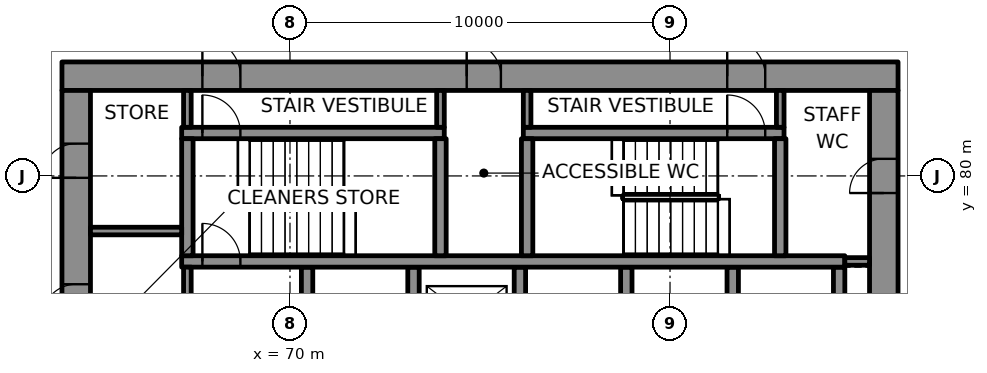
"""IFC4 building model, lengths in metres.
Left out: names, types, materials, properties, quantities, classifications, styles, units other than length and angle.
Written with IfcOpenShell. Run it as: python <this file> out.ifc"""

import sys

from ifc_helpers import new_model, si_unit, direction, frame, frame_2d, origin, place, context, subcontext, project, spatial, rectangle, extrude, element, fill, save


model = new_model("IFC4")
c1 = context("Model", 3, precision=1e-05, world=origin(), true_north=direction((0.0, 1.0)))
c2 = subcontext(c1, "Body", "Model", "MODEL_VIEW")
j1 = project(units=[si_unit("LENGTHUNIT", "METRE"), si_unit("PLANEANGLEUNIT", "RADIAN")], contexts=[c1])
p1 = place(None, origin())
s1 = spatial("IfcSite", under=j1, at=p1, CompositionType="ELEMENT")
p2 = place(p1, origin())
s2 = spatial("IfcBuilding", under=s1, at=p2, CompositionType="ELEMENT")
p3 = place(p2, frame((0.0, 0.0, 241.6)))
s3 = spatial("IfcBuildingStorey", under=s2, at=p3, CompositionType="ELEMENT", Elevation=241.6)
p4 = place(p3, frame((64.0, 82.625, 0.0), z_axis=(0.0, 0.0, 1.0), x_axis=(1.0, 0.0, 0.0)))
e1 = element("IfcWall", 1, at=p4, inside=s3, PredefinedType="SHEAR", context=c2, shape_type="SweptSolid", body=[
    extrude(rectangle(XDim=22.0, YDim=0.75, at=frame_2d((11.0, 0.0))), origin(), (0.0, 0.0, 1.0), 5.55),
])
p5 = place(p4, frame((3.695, 0.0, 0.0)))
e2 = element("IfcOpeningElement", 2, at=p5, cuts=e1, PredefinedType="OPENING", context=c2, shape_type="SweptSolid", body=[
    extrude(rectangle(XDim=1.0, YDim=2.1, at=frame_2d((0.5, 1.05))), frame((0.0, 0.385, 0.0), z_axis=(0.0, -1.0, 0.0), x_axis=(1.0, 0.0, 0.0)), (0.0, 0.0, 1.0), 0.77),
])
p6 = place(p4, frame((17.505, 0.0, 0.0)))
e3 = element("IfcOpeningElement", 3, at=p6, cuts=e1, PredefinedType="OPENING", context=c2, shape_type="SweptSolid", body=[
    extrude(rectangle(XDim=1.0, YDim=2.1, at=frame_2d((0.5, 1.05))), frame((0.0, 0.385, 0.0), z_axis=(0.0, -1.0, 0.0), x_axis=(1.0, 0.0, 0.0)), (0.0, 0.0, 1.0), 0.77),
])
p7 = place(p4, frame((10.65, 0.0, 0.0)))
e4 = element("IfcOpeningElement", 4, at=p7, cuts=e1, PredefinedType="OPENING", context=c2, shape_type="SweptSolid", body=[
    extrude(rectangle(XDim=0.9, YDim=2.1, at=frame_2d((0.45, 1.05))), frame((0.0, 0.385, 0.0), z_axis=(0.0, -1.0, 0.0), x_axis=(1.0, 0.0, 0.0)), (0.0, 0.0, 1.0), 0.77),
])
p8 = place(p3, frame((64.375, 67.75, 0.0), z_axis=(0.0, 0.0, 1.0), x_axis=(0.0, 1.0, 0.0)))
e5 = element("IfcWall", 5, at=p8, inside=s3, PredefinedType="SHEAR", context=c2, shape_type="SweptSolid", body=[
    extrude(rectangle(XDim=14.5, YDim=0.75, at=frame_2d((7.25, 0.0))), origin(), (0.0, 0.0, 1.0), 5.55),
])
p9 = place(p8, frame((4.65, 0.0, 0.0)))
e6 = element("IfcOpeningElement", 6, at=p9, cuts=e5, PredefinedType="OPENING", context=c2, shape_type="SweptSolid", body=[
    extrude(rectangle(XDim=1.8, YDim=2.1, at=frame_2d((0.9, 1.05))), frame((0.0, 0.385, 0.0), z_axis=(0.0, -1.0, 0.0), x_axis=(1.0, 0.0, 0.0)), (0.0, 0.0, 1.0), 0.77),
])
p10 = place(p8, frame((8.5, 0.0, 0.0)))
e7 = element("IfcOpeningElement", 7, at=p10, cuts=e5, PredefinedType="OPENING", context=c2, shape_type="SweptSolid", body=[
    extrude(rectangle(XDim=0.9, YDim=2.1, at=frame_2d((0.45, 1.05))), frame((0.0, 0.385, 0.0), z_axis=(0.0, -1.0, 0.0), x_axis=(1.0, 0.0, 0.0)), (0.0, 0.0, 1.0), 0.77),
])
p11 = place(p8, frame((12.2, 0.0, 0.0)))
e8 = element("IfcOpeningElement", 8, at=p11, cuts=e5, PredefinedType="OPENING", context=c2, shape_type="SweptSolid", body=[
    extrude(rectangle(XDim=0.9, YDim=2.1, at=frame_2d((0.45, 1.05))), frame((0.0, 0.385, 0.0), z_axis=(0.0, -1.0, 0.0), x_axis=(1.0, 0.0, 0.0)), (0.0, 0.0, 1.0), 0.77),
])
p12 = place(p3, frame((85.625, 67.75, 0.0), z_axis=(0.0, 0.0, 1.0), x_axis=(0.0, 1.0, 0.0)))
e9 = element("IfcWall", 9, at=p12, inside=s3, PredefinedType="SHEAR", context=c2, shape_type="SweptSolid", body=[
    extrude(rectangle(XDim=14.5, YDim=0.75, at=frame_2d((7.25, 0.0))), origin(), (0.0, 0.0, 1.0), 5.55),
])
p13 = place(p12, frame((4.65, 0.0, 0.0)))
e10 = element("IfcOpeningElement", 10, at=p13, cuts=e9, PredefinedType="OPENING", context=c2, shape_type="SweptSolid", body=[
    extrude(rectangle(XDim=1.8, YDim=2.1, at=frame_2d((0.9, 1.05))), frame((0.0, 0.385, 0.0), z_axis=(0.0, -1.0, 0.0), x_axis=(1.0, 0.0, 0.0)), (0.0, 0.0, 1.0), 0.77),
])
p14 = place(p12, frame((11.8, 0.0, 0.0)))
e11 = element("IfcOpeningElement", 11, at=p14, cuts=e9, PredefinedType="OPENING", context=c2, shape_type="SweptSolid", body=[
    extrude(rectangle(XDim=0.9, YDim=2.1, at=frame_2d((0.45, 1.05))), frame((0.0, 0.385, 0.0), z_axis=(0.0, -1.0, 0.0), x_axis=(1.0, 0.0, 0.0)), (0.0, 0.0, 1.0), 0.77),
])
p15 = place(p3, frame((70.45, 75.0, 0.0), z_axis=(0.0, 0.0, 1.0), x_axis=(0.0, 1.0, 0.0)))
e12 = element("IfcWall", 12, at=p15, inside=s3, PredefinedType="SHEAR", context=c2, shape_type="SweptSolid", body=[
    extrude(rectangle(XDim=2.6, YDim=0.3, at=frame_2d((1.3, 0.0))), origin(), (0.0, 0.0, 1.0), 5.55),
])
p16 = place(p15, frame((0.15, 0.0, 0.0)))
e13 = element("IfcOpeningElement", 13, at=p16, cuts=e12, PredefinedType="OPENING", context=c2, shape_type="SweptSolid", body=[
    extrude(rectangle(XDim=1.1, YDim=2.1, at=frame_2d((0.55, 1.05))), frame((0.0, 0.16, 0.0), z_axis=(0.0, -1.0, 0.0), x_axis=(1.0, 0.0, 0.0)), (0.0, 0.0, 1.0), 0.32),
])
for number, where, z_axis, x_axis in (
    (14, (73.25, 75.0, 0.0), (0.0, 0.0, 1.0), (0.0, 1.0, 0.0)),
    (15, (76.05, 75.0, 0.0), (0.0, 0.0, 1.0), (0.0, 1.0, 0.0)),
    (16, (78.85, 75.0, 0.0), (0.0, 0.0, 1.0), (0.0, 1.0, 0.0)),
    (17, (81.65, 75.0, 0.0), (0.0, 0.0, 1.0), (0.0, 1.0, 0.0)),
    (18, (84.45, 75.0, 0.0), (0.0, 0.0, 1.0), (0.0, 1.0, 0.0)),
):
    element("IfcWall", number, at=place(p3, frame(where, z_axis=z_axis, x_axis=x_axis)), inside=s3, PredefinedType="SHEAR", context=c2, shape_type="SweptSolid", body=[
        extrude(rectangle(XDim=2.6, YDim=0.3, at=frame_2d((1.3, 0.0))), origin(), (0.0, 0.0, 1.0), 5.55),
    ])
p17 = place(p3, frame((67.15, 77.75, 0.0), z_axis=(0.0, 0.0, 1.0), x_axis=(1.0, 0.0, 0.0)))
e19 = element("IfcWall", 19, at=p17, inside=s3, PredefinedType="SHEAR", context=c2, shape_type="SweptSolid", body=[
    extrude(rectangle(XDim=17.45, YDim=0.3, at=frame_2d((8.725, 0.0))), origin(), (0.0, 0.0, 1.0), 5.55),
])
p18 = place(p17, frame((0.545, 0.0, 0.0)))
e20 = element("IfcOpeningElement", 20, at=p18, cuts=e19, PredefinedType="OPENING", context=c2, shape_type="SweptSolid", body=[
    extrude(rectangle(XDim=1.0, YDim=2.1, at=frame_2d((0.5, 1.05))), frame((0.0, 0.16, 0.0), z_axis=(0.0, -1.0, 0.0), x_axis=(1.0, 0.0, 0.0)), (0.0, 0.0, 1.0), 0.32),
])
p19 = place(p3, frame((67.15, 81.13, 0.0), z_axis=(0.0, 0.0, 1.0), x_axis=(1.0, 0.0, 0.0)))
e21 = element("IfcWall", 21, at=p19, inside=s3, PredefinedType="SHEAR", context=c2, shape_type="SweptSolid", body=[
    extrude(rectangle(XDim=6.91, YDim=0.3, at=frame_2d((3.455, 0.0))), origin(), (0.0, 0.0, 1.0), 5.55),
])
p20 = place(p19, frame((0.545, 0.0, 0.0)))
e22 = element("IfcOpeningElement", 22, at=p20, cuts=e21, PredefinedType="OPENING", context=c2, shape_type="SweptSolid", body=[
    extrude(rectangle(XDim=1.0, YDim=2.1, at=frame_2d((0.5, 1.05))), frame((0.0, 0.16, 0.0), z_axis=(0.0, -1.0, 0.0), x_axis=(1.0, 0.0, 0.0)), (0.0, 0.0, 1.0), 0.32),
])
p21 = place(p3, frame((76.14, 81.13, 0.0), z_axis=(0.0, 0.0, 1.0), x_axis=(1.0, 0.0, 0.0)))
e23 = element("IfcWall", 23, at=p21, inside=s3, PredefinedType="SHEAR", context=c2, shape_type="SweptSolid", body=[
    extrude(rectangle(XDim=6.86, YDim=0.3, at=frame_2d((3.43, 0.0))), origin(), (0.0, 0.0, 1.0), 5.55),
])
p22 = place(p21, frame((5.365, 0.0, 0.0)))
e24 = element("IfcOpeningElement", 24, at=p22, cuts=e23, PredefinedType="OPENING", context=c2, shape_type="SweptSolid", body=[
    extrude(rectangle(XDim=1.0, YDim=2.1, at=frame_2d((0.5, 1.05))), frame((0.0, 0.16, 0.0), z_axis=(0.0, -1.0, 0.0), x_axis=(1.0, 0.0, 0.0)), (0.0, 0.0, 1.0), 0.32),
])
for number, where, z_axis, x_axis in (
    (25, (67.3, 77.9, 0.0), (0.0, 0.0, 1.0), (0.0, 1.0, 0.0)),
    (26, (73.96, 77.9, 0.0), (0.0, 0.0, 1.0), (0.0, 1.0, 0.0)),
    (27, (76.24, 77.9, 0.0), (0.0, 0.0, 1.0), (0.0, 1.0, 0.0)),
    (28, (82.9, 77.9, 0.0), (0.0, 0.0, 1.0), (0.0, 1.0, 0.0)),
):
    element("IfcWall", number, at=place(p3, frame(where, z_axis=z_axis, x_axis=x_axis)), inside=s3, PredefinedType="SHEAR", context=c2, shape_type="SweptSolid", body=[
        extrude(rectangle(XDim=3.08, YDim=0.3, at=frame_2d((1.54, 0.0))), origin(), (0.0, 0.0, 1.0), 5.55),
    ])
p23 = place(p3, frame((84.6, 77.75, 0.0), z_axis=(0.0, 0.0, 1.0), x_axis=(1.0, 0.0, 0.0)))
e29 = element("IfcWall", 29, at=p23, inside=s3, PredefinedType="PARTITIONING", context=c2, shape_type="SweptSolid", body=[
    extrude(rectangle(XDim=0.65, YDim=0.2, at=frame_2d((0.325, 0.0))), origin(), (0.0, 0.0, 1.0), 5.55),
])
p24 = place(p3, frame((64.75, 78.55, 0.0), z_axis=(0.0, 0.0, 1.0), x_axis=(1.0, 0.0, 0.0)))
e30 = element("IfcWall", 30, at=p24, inside=s3, PredefinedType="PARTITIONING", context=c2, shape_type="SweptSolid", body=[
    extrude(rectangle(XDim=2.4, YDim=0.2, at=frame_2d((1.2, 0.0))), origin(), (0.0, 0.0, 1.0), 5.55),
])
p25 = place(p3, frame((67.3, 71.85, 0.0), z_axis=(0.0, 0.0, 1.0), x_axis=(0.0, 1.0, 0.0)))
e31 = element("IfcWall", 31, at=p25, inside=s3, PredefinedType="PARTITIONING", context=c2, shape_type="SweptSolid", body=[
    extrude(rectangle(XDim=5.75, YDim=0.2, at=frame_2d((2.875, 0.0))), origin(), (0.0, 0.0, 1.0), 5.55),
])
p26 = place(p25, frame((0.85, 0.0, 0.0)))
e32 = element("IfcOpeningElement", 32, at=p26, cuts=e31, PredefinedType="OPENING", context=c2, shape_type="SweptSolid", body=[
    extrude(rectangle(XDim=1.2, YDim=2.1, at=frame_2d((0.6, 1.05))), frame((0.0, 0.11, 0.0), z_axis=(0.0, -1.0, 0.0), x_axis=(1.0, 0.0, 0.0)), (0.0, 0.0, 1.0), 0.22),
])
for number, where, z_axis, x_axis in (
    (33, (67.3, 81.28, 0.0), (0.0, 0.0, 1.0), (0.0, 1.0, 0.0)),
    (34, (73.96, 81.28, 0.0), (0.0, 0.0, 1.0), (0.0, 1.0, 0.0)),
    (35, (76.24, 81.28, 0.0), (0.0, 0.0, 1.0), (0.0, 1.0, 0.0)),
    (36, (82.9, 81.28, 0.0), (0.0, 0.0, 1.0), (0.0, 1.0, 0.0)),
):
    element("IfcWall", number, at=place(p3, frame(where, z_axis=z_axis, x_axis=x_axis)), inside=s3, PredefinedType="PARTITIONING", context=c2, shape_type="SweptSolid", body=[
        extrude(rectangle(XDim=0.97, YDim=0.2, at=frame_2d((0.485, 0.0))), origin(), (0.0, 0.0, 1.0), 5.55),
    ])
p27 = place(p18, origin())
e37 = element("IfcDoor", 37, at=p27, inside=s3, OperationType="SINGLE_SWING_LEFT", PredefinedType="DOOR", context=c2, shape_type="SweptSolid", body=[
    extrude(rectangle(XDim=1.0, YDim=2.1, at=frame_2d((0.5, 1.05))), frame((0.0, 0.025, 0.0), z_axis=(0.0, -1.0, 0.0), x_axis=(1.0, 0.0, 0.0)), (0.0, 0.0, 1.0), 0.05),
])
fill(e20, e37)
p28 = place(p20, origin())
e38 = element("IfcDoor", 38, at=p28, inside=s3, OperationType="SINGLE_SWING_RIGHT", PredefinedType="DOOR", context=c2, shape_type="SweptSolid", body=[
    extrude(rectangle(XDim=1.0, YDim=2.1, at=frame_2d((0.5, 1.05))), frame((0.0, 0.025, 0.0), z_axis=(0.0, -1.0, 0.0), x_axis=(1.0, 0.0, 0.0)), (0.0, 0.0, 1.0), 0.05),
])
fill(e22, e38)
p29 = place(p5, origin())
e39 = element("IfcDoor", 39, at=p29, inside=s3, OperationType="SINGLE_SWING_LEFT", PredefinedType="DOOR", context=c2, shape_type="SweptSolid", body=[
    extrude(rectangle(XDim=1.0, YDim=2.1, at=frame_2d((0.5, 1.05))), frame((0.0, 0.095, 0.0), z_axis=(0.0, -1.0, 0.0), x_axis=(1.0, 0.0, 0.0)), (0.0, 0.0, 1.0), 0.19),
])
fill(e2, e39)
p30 = place(p22, origin())
e40 = element("IfcDoor", 40, at=p30, inside=s3, OperationType="SINGLE_SWING_RIGHT", PredefinedType="DOOR", context=c2, shape_type="SweptSolid", body=[
    extrude(rectangle(XDim=1.0, YDim=2.1, at=frame_2d((0.5, 1.05))), frame((0.0, 0.025, 0.0), z_axis=(0.0, -1.0, 0.0), x_axis=(1.0, 0.0, 0.0)), (0.0, 0.0, 1.0), 0.05),
])
fill(e24, e40)
p31 = place(p6, origin())
e41 = element("IfcDoor", 41, at=p31, inside=s3, OperationType="SINGLE_SWING_LEFT", PredefinedType="DOOR", context=c2, shape_type="SweptSolid", body=[
    extrude(rectangle(XDim=1.0, YDim=2.1, at=frame_2d((0.5, 1.05))), frame((0.0, 0.095, 0.0), z_axis=(0.0, -1.0, 0.0), x_axis=(1.0, 0.0, 0.0)), (0.0, 0.0, 1.0), 0.19),
])
fill(e3, e41)
p32 = place(p10, origin())
e42 = element("IfcDoor", 42, at=p32, inside=s3, OperationType="SINGLE_SWING_RIGHT", PredefinedType="DOOR", context=c2, shape_type="SweptSolid", body=[
    extrude(rectangle(XDim=0.9, YDim=2.1, at=frame_2d((0.45, 1.05))), frame((0.0, 0.095, 0.0), z_axis=(0.0, -1.0, 0.0), x_axis=(1.0, 0.0, 0.0)), (0.0, 0.0, 1.0), 0.19),
])
fill(e7, e42)
p33 = place(p11, origin())
e43 = element("IfcDoor", 43, at=p33, inside=s3, OperationType="SINGLE_SWING_LEFT", PredefinedType="DOOR", context=c2, shape_type="SweptSolid", body=[
    extrude(rectangle(XDim=0.9, YDim=2.1, at=frame_2d((0.45, 1.05))), frame((0.0, 0.095, 0.0), z_axis=(0.0, -1.0, 0.0), x_axis=(1.0, 0.0, 0.0)), (0.0, 0.0, 1.0), 0.19),
])
fill(e8, e43)
p34 = place(p7, origin())
e44 = element("IfcDoor", 44, at=p34, inside=s3, OperationType="SINGLE_SWING_RIGHT", PredefinedType="DOOR", context=c2, shape_type="SweptSolid", body=[
    extrude(rectangle(XDim=0.9, YDim=2.1, at=frame_2d((0.45, 1.05))), frame((0.0, 0.095, 0.0), z_axis=(0.0, -1.0, 0.0), x_axis=(1.0, 0.0, 0.0)), (0.0, 0.0, 1.0), 0.19),
])
fill(e4, e44)
p35 = place(p14, origin())
e45 = element("IfcDoor", 45, at=p35, inside=s3, OperationType="SINGLE_SWING_LEFT", PredefinedType="DOOR", context=c2, shape_type="SweptSolid", body=[
    extrude(rectangle(XDim=0.9, YDim=2.1, at=frame_2d((0.45, 1.05))), frame((0.0, 0.095, 0.0), z_axis=(0.0, -1.0, 0.0), x_axis=(1.0, 0.0, 0.0)), (0.0, 0.0, 1.0), 0.19),
])
fill(e11, e45)
save(model, sys.argv[1])
